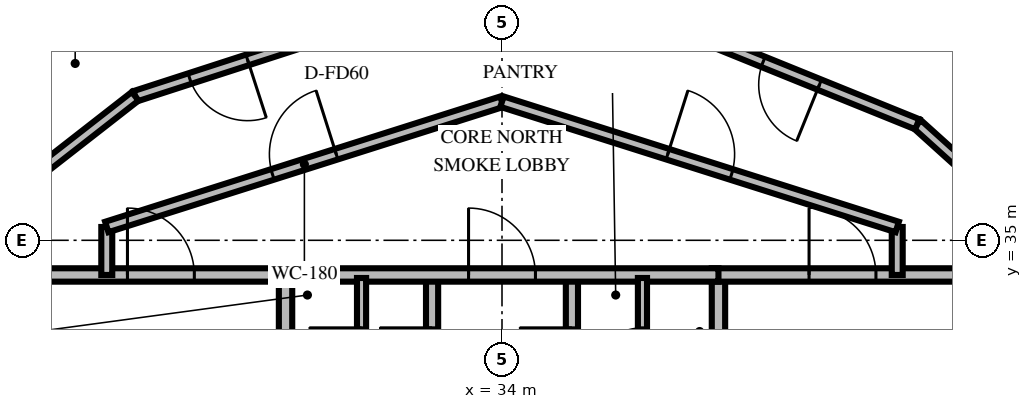
"""IFC4 building model, lengths in metres.
Left out: names, types, materials, properties, quantities, classifications, styles, units other than length and angle.
Written with IfcOpenShell. Run it as: python <this file> out.ifc"""

import sys

from ifc_helpers import new_model, si_unit, direction, frame, frame_2d, origin, place, context, subcontext, project, spatial, rectangle, extrude, element, fill, save


model = new_model("IFC4")
c1 = context("Model", 3, precision=1e-05, world=origin(), true_north=direction((0.0, 1.0)))
c2 = subcontext(c1, "Body", "Model", "MODEL_VIEW")
j1 = project(units=[si_unit("LENGTHUNIT", "METRE"), si_unit("PLANEANGLEUNIT", "RADIAN")], contexts=[c1])
p1 = place(None, origin())
s1 = spatial("IfcSite", under=j1, at=p1, CompositionType="ELEMENT")
p2 = place(p1, origin())
s2 = spatial("IfcBuilding", under=s1, at=p2, CompositionType="ELEMENT")
p3 = place(p2, frame((0.0, 0.0, 270.0)))
s3 = spatial("IfcBuildingStorey", under=s2, at=p3, CompositionType="ELEMENT", Elevation=270.0)
p4 = place(p3, frame((27.754, 42.299, 0.0), z_axis=(0.0, 0.0, 1.0), x_axis=(-0.738936247596, -0.673775349793, 0.0)))
e1 = element("IfcWall", 1, at=p4, inside=s3, PredefinedType="SOLIDWALL", context=c2, shape_type="SweptSolid", body=[
    extrude(rectangle(XDim=7.115, YDim=0.3, at=frame_2d((3.558, 0.0))), origin(), (0.0, 0.0, 1.0), 2.76),
])
p5 = place(p4, frame((2.508, 0.0, 0.8)))
e2 = element("IfcOpeningElement", 2, at=p5, cuts=e1, PredefinedType="OPENING", context=c2, shape_type="SweptSolid", body=[
    extrude(rectangle(XDim=2.1, YDim=1.85, at=frame_2d((1.05, 0.925))), frame((0.0, 0.16, 0.0), z_axis=(0.0, -1.0, 0.0), x_axis=(1.0, 0.0, 0.0)), (0.0, 0.0, 1.0), 0.32),
])
p6 = place(p3, frame((30.44, 30.05, 0.0), z_axis=(0.0, 0.0, 1.0), x_axis=(0.0, 1.0, 0.0)))
e3 = element("IfcWall", 3, at=p6, inside=s3, PredefinedType="SOLIDWALL", context=c2, shape_type="SweptSolid", body=[
    extrude(rectangle(XDim=4.38, YDim=0.22, at=frame_2d((2.19, 0.0))), origin(), (0.0, 0.0, 1.0), 2.46),
])
p7 = place(p6, frame((0.8, 0.0, 0.0)))
e4 = element("IfcOpeningElement", 4, at=p7, cuts=e3, PredefinedType="OPENING", context=c2, shape_type="SweptSolid", body=[
    extrude(rectangle(XDim=1.05, YDim=2.1, at=frame_2d((0.525, 1.05))), frame((0.0, 0.12, 0.0), z_axis=(0.0, -1.0, 0.0), x_axis=(1.0, 0.0, 0.0)), (0.0, 0.0, 1.0), 0.24),
])
p8 = place(p3, frame((26.24, 34.43, 0.0), z_axis=(0.0, 0.0, 1.0), x_axis=(1.0, 0.0, 0.0)))
e5 = element("IfcWall", 5, at=p8, inside=s3, PredefinedType="SOLIDWALL", context=c2, shape_type="SweptSolid", body=[
    extrude(rectangle(XDim=4.31, YDim=0.22, at=frame_2d((2.155, 0.0))), origin(), (0.0, 0.0, 1.0), 2.46),
])
p9 = place(p8, frame((1.6, 0.0, 0.0)))
e6 = element("IfcOpeningElement", 6, at=p9, cuts=e5, PredefinedType="OPENING", context=c2, shape_type="SweptSolid", body=[
    extrude(rectangle(XDim=1.1, YDim=2.15, at=frame_2d((0.55, 1.075))), frame((0.0, 0.12, 0.0), z_axis=(0.0, -1.0, 0.0), x_axis=(1.0, 0.0, 0.0)), (0.0, 0.0, 1.0), 0.24),
])
p10 = place(p3, frame((32.85, 30.05, 0.0), z_axis=(0.0, 0.0, 1.0), x_axis=(0.0, 1.0, 0.0)))
e7 = element("IfcWall", 7, at=p10, inside=s3, PredefinedType="SOLIDWALL", context=c2, shape_type="SweptSolid", body=[
    extrude(rectangle(XDim=4.38, YDim=0.2, at=frame_2d((2.19, 0.0))), origin(), (0.0, 0.0, 1.0), 2.46),
])
p11 = place(p10, frame((2.65, 0.0, 0.0)))
e8 = element("IfcOpeningElement", 8, at=p11, cuts=e7, PredefinedType="OPENING", context=c2, shape_type="SweptSolid", body=[
    extrude(rectangle(XDim=0.86, YDim=2.05, at=frame_2d((0.43, 1.025))), frame((0.0, 0.11, 0.0), z_axis=(0.0, -1.0, 0.0), x_axis=(1.0, 0.0, 0.0)), (0.0, 0.0, 1.0), 0.22),
])
p12 = place(p3, frame((37.56, 30.05, 0.0), z_axis=(0.0, 0.0, 1.0), x_axis=(0.0, 1.0, 0.0)))
e9 = element("IfcWall", 9, at=p12, inside=s3, PredefinedType="SOLIDWALL", context=c2, shape_type="SweptSolid", body=[
    extrude(rectangle(XDim=4.38, YDim=0.22, at=frame_2d((2.19, 0.0))), origin(), (0.0, 0.0, 1.0), 2.46),
])
p13 = place(p12, frame((0.8, 0.0, 0.0)))
e10 = element("IfcOpeningElement", 10, at=p13, cuts=e9, PredefinedType="OPENING", context=c2, shape_type="SweptSolid", body=[
    extrude(rectangle(XDim=1.05, YDim=2.1, at=frame_2d((0.525, 1.05))), frame((0.0, 0.12, 0.0), z_axis=(0.0, -1.0, 0.0), x_axis=(1.0, 0.0, 0.0)), (0.0, 0.0, 1.0), 0.24),
])
p14 = place(p3, frame((37.45, 34.43, 0.0), z_axis=(0.0, 0.0, 1.0), x_axis=(1.0, 0.0, 0.0)))
e11 = element("IfcWall", 11, at=p14, inside=s3, PredefinedType="SOLIDWALL", context=c2, shape_type="SweptSolid", body=[
    extrude(rectangle(XDim=4.31, YDim=0.22, at=frame_2d((2.155, 0.0))), origin(), (0.0, 0.0, 1.0), 2.46),
])
p15 = place(p14, frame((1.6, 0.0, 0.0)))
e12 = element("IfcOpeningElement", 12, at=p15, cuts=e11, PredefinedType="OPENING", context=c2, shape_type="SweptSolid", body=[
    extrude(rectangle(XDim=1.1, YDim=2.15, at=frame_2d((0.55, 1.075))), frame((0.0, 0.12, 0.0), z_axis=(0.0, -1.0, 0.0), x_axis=(1.0, 0.0, 0.0)), (0.0, 0.0, 1.0), 0.24),
])
p16 = place(p3, frame((35.15, 30.05, 0.0), z_axis=(0.0, 0.0, 1.0), x_axis=(0.0, 1.0, 0.0)))
e13 = element("IfcWall", 13, at=p16, inside=s3, PredefinedType="SOLIDWALL", context=c2, shape_type="SweptSolid", body=[
    extrude(rectangle(XDim=4.38, YDim=0.2, at=frame_2d((2.19, 0.0))), origin(), (0.0, 0.0, 1.0), 2.46),
])
p17 = place(p16, frame((2.65, 0.0, 0.0)))
e14 = element("IfcOpeningElement", 14, at=p17, cuts=e13, PredefinedType="OPENING", context=c2, shape_type="SweptSolid", body=[
    extrude(rectangle(XDim=0.86, YDim=2.05, at=frame_2d((0.43, 1.025))), frame((0.0, 0.11, 0.0), z_axis=(0.0, -1.0, 0.0), x_axis=(1.0, 0.0, 0.0)), (0.0, 0.0, 1.0), 0.22),
])
p18 = place(p3, frame((30.44, 34.43, 0.0), z_axis=(0.0, 0.0, 1.0), x_axis=(1.0, 0.0, 0.0)))
e15 = element("IfcWall", 15, at=p18, inside=s3, PredefinedType="SOLIDWALL", context=c2, shape_type="SweptSolid", body=[
    extrude(rectangle(XDim=7.12, YDim=0.22, at=frame_2d((3.56, 0.0))), origin(), (0.0, 0.0, 1.0), 2.46),
])
p19 = place(p18, frame((3.01, 0.0, 0.0)))
e16 = element("IfcOpeningElement", 16, at=p19, cuts=e15, PredefinedType="OPENING", context=c2, shape_type="SweptSolid", body=[
    extrude(rectangle(XDim=1.1, YDim=2.15, at=frame_2d((0.55, 1.075))), frame((0.0, 0.12, 0.0), z_axis=(0.0, -1.0, 0.0), x_axis=(1.0, 0.0, 0.0)), (0.0, 0.0, 1.0), 0.24),
])
p20 = place(p3, frame((31.69, 32.05, 0.0), z_axis=(0.0, 0.0, 1.0), x_axis=(0.0, 1.0, 0.0)))
e17 = element("IfcWall", 17, at=p20, inside=s3, PredefinedType="PARTITIONING", context=c2, shape_type="SweptSolid", body=[
    extrude(rectangle(XDim=2.33, YDim=0.15, at=frame_2d((1.165, 0.0))), origin(), (0.0, 0.0, 1.0), 2.46),
])
p21 = place(p20, frame((0.65, 0.0, 0.0)))
e18 = element("IfcOpeningElement", 18, at=p21, cuts=e17, PredefinedType="OPENING", context=c2, shape_type="SweptSolid", body=[
    extrude(rectangle(XDim=0.86, YDim=2.05, at=frame_2d((0.43, 1.025))), frame((0.0, 0.085, 0.0), z_axis=(0.0, -1.0, 0.0), x_axis=(1.0, 0.0, 0.0)), (0.0, 0.0, 1.0), 0.17),
])
p22 = place(p3, frame((36.31, 32.05, 0.0), z_axis=(0.0, 0.0, 1.0), x_axis=(0.0, 1.0, 0.0)))
e19 = element("IfcWall", 19, at=p22, inside=s3, PredefinedType="PARTITIONING", context=c2, shape_type="SweptSolid", body=[
    extrude(rectangle(XDim=2.33, YDim=0.15, at=frame_2d((1.165, 0.0))), origin(), (0.0, 0.0, 1.0), 2.46),
])
p23 = place(p22, frame((0.65, 0.0, 0.0)))
e20 = element("IfcOpeningElement", 20, at=p23, cuts=e19, PredefinedType="OPENING", context=c2, shape_type="SweptSolid", body=[
    extrude(rectangle(XDim=0.86, YDim=2.05, at=frame_2d((0.43, 1.025))), frame((0.0, 0.085, 0.0), z_axis=(0.0, -1.0, 0.0), x_axis=(1.0, 0.0, 0.0)), (0.0, 0.0, 1.0), 0.17),
])
for number, where, z_axis, x_axis in (
    (21, (27.5, 34.43, 0.0), (0.0, 0.0, 1.0), (0.0, 1.0, 0.0)),
    (22, (40.5, 35.219, 0.0), (0.0, 0.0, 1.0), (0.0, -1.0, 0.0)),
):
    element("IfcWall", number, at=place(p3, frame(where, z_axis=z_axis, x_axis=x_axis)), inside=s3, PredefinedType="PARTITIONING", context=c2, shape_type="SweptSolid", body=[
        extrude(rectangle(XDim=0.789, YDim=0.18, at=frame_2d((0.395, 0.0))), origin(), (0.0, 0.0, 1.0), 2.46),
    ])
p24 = place(p3, frame((27.5, 35.219, 0.0), z_axis=(0.0, 0.0, 1.0), x_axis=(0.953228121756, 0.302251795518, 0.0)))
e23 = element("IfcWall", 23, at=p24, inside=s3, PredefinedType="PARTITIONING", context=c2, shape_type="SweptSolid", body=[
    extrude(rectangle(XDim=6.819, YDim=0.18, at=frame_2d((3.409, 0.0))), origin(), (0.0, 0.0, 1.0), 2.46),
])
p25 = place(p24, frame((2.86, 0.0, 0.0)))
e24 = element("IfcOpeningElement", 24, at=p25, cuts=e23, PredefinedType="OPENING", context=c2, shape_type="SweptSolid", body=[
    extrude(rectangle(XDim=1.1, YDim=2.15, at=frame_2d((0.55, 1.075))), frame((0.0, 0.1, 0.0), z_axis=(0.0, -1.0, 0.0), x_axis=(1.0, 0.0, 0.0)), (0.0, 0.0, 1.0), 0.2),
])
p26 = place(p3, frame((34.0, 37.28, 0.0), z_axis=(0.0, 0.0, 1.0), x_axis=(0.953228121756, -0.302251795518, 0.0)))
e25 = element("IfcWall", 25, at=p26, inside=s3, PredefinedType="PARTITIONING", context=c2, shape_type="SweptSolid", body=[
    extrude(rectangle(XDim=6.819, YDim=0.18, at=frame_2d((3.409, 0.0))), origin(), (0.0, 0.0, 1.0), 2.46),
])
p27 = place(p26, frame((2.86, 0.0, 0.0)))
e26 = element("IfcOpeningElement", 26, at=p27, cuts=e25, PredefinedType="OPENING", context=c2, shape_type="SweptSolid", body=[
    extrude(rectangle(XDim=1.1, YDim=2.15, at=frame_2d((0.55, 1.075))), frame((0.0, 0.1, 0.0), z_axis=(0.0, -1.0, 0.0), x_axis=(1.0, 0.0, 0.0)), (0.0, 0.0, 1.0), 0.2),
])
p28 = place(p3, frame((44.149, 33.915, 0.0), z_axis=(0.0, 0.0, 1.0), x_axis=(-0.742573984857, 0.669764045775, 0.0)))
e27 = element("IfcWall", 27, at=p28, inside=s3, PredefinedType="PARTITIONING", context=c2, shape_type="SweptSolid", body=[
    extrude(rectangle(XDim=4.47, YDim=0.18, at=frame_2d((2.235, 0.0))), origin(), (0.0, 0.0, 1.0), 2.46),
])
p29 = place(p3, frame((40.83, 36.908, 0.0), z_axis=(0.0, 0.0, 1.0), x_axis=(-0.926859496036, 0.375408410411, 0.0)))
e28 = element("IfcWall", 28, at=p29, inside=s3, PredefinedType="PARTITIONING", context=c2, shape_type="SweptSolid", body=[
    extrude(rectangle(XDim=4.47, YDim=0.18, at=frame_2d((2.235, 0.0))), origin(), (0.0, 0.0, 1.0), 2.46),
])
p30 = place(p29, frame((1.735, 0.0, 0.0)))
e29 = element("IfcOpeningElement", 29, at=p30, cuts=e28, PredefinedType="OPENING", context=c2, shape_type="SweptSolid", body=[
    extrude(rectangle(XDim=1.0, YDim=2.15, at=frame_2d((0.5, 1.075))), frame((0.0, 0.1, 0.0), z_axis=(0.0, -1.0, 0.0), x_axis=(1.0, 0.0, 0.0)), (0.0, 0.0, 1.0), 0.2),
])
p31 = place(p3, frame((32.22, 38.746, 0.0), z_axis=(0.0, 0.0, 1.0), x_axis=(-0.951331063375, -0.30817074465, 0.0)))
e30 = element("IfcWall", 30, at=p31, inside=s3, PredefinedType="PARTITIONING", context=c2, shape_type="SweptSolid", body=[
    extrude(rectangle(XDim=4.47, YDim=0.18, at=frame_2d((2.235, 0.0))), origin(), (0.0, 0.0, 1.0), 2.46),
])
p32 = place(p31, frame((2.527, 0.0, 0.0)))
e31 = element("IfcOpeningElement", 31, at=p32, cuts=e30, PredefinedType="OPENING", context=c2, shape_type="SweptSolid", body=[
    extrude(rectangle(XDim=1.0, YDim=2.15, at=frame_2d((0.5, 1.075))), frame((0.0, 0.1, 0.0), z_axis=(0.0, -1.0, 0.0), x_axis=(1.0, 0.0, 0.0)), (0.0, 0.0, 1.0), 0.2),
])
p33 = place(p3, frame((27.968, 37.369, 0.0), z_axis=(0.0, 0.0, 1.0), x_axis=(-0.78855157168, -0.614968632371, 0.0)))
e32 = element("IfcWall", 32, at=p33, inside=s3, PredefinedType="PARTITIONING", context=c2, shape_type="SweptSolid", body=[
    extrude(rectangle(XDim=4.47, YDim=0.18, at=frame_2d((2.235, 0.0))), origin(), (0.0, 0.0, 1.0), 2.46),
])
p34 = place(p3, frame((27.101, 39.003, 0.0), z_axis=(0.0, 0.0, 1.0), x_axis=(-0.78853889841, -0.614984882492, 0.0)))
e33 = element("IfcWall", 33, at=p34, inside=s3, PredefinedType="PARTITIONING", context=c2, shape_type="SweptSolid", body=[
    extrude(rectangle(XDim=5.112, YDim=0.125, at=frame_2d((2.556, 0.0))), origin(), (0.0, 0.0, 1.0), 2.46),
])
p35 = place(p9, origin())
e34 = element("IfcDoor", 34, at=p35, inside=s3, OperationType="SINGLE_SWING_LEFT", PredefinedType="DOOR", context=c2, shape_type="SweptSolid", body=[
    extrude(rectangle(XDim=1.1, YDim=2.15, at=frame_2d((0.55, 1.075))), frame((0.0, 0.025, 0.0), z_axis=(0.0, -1.0, 0.0), x_axis=(1.0, 0.0, 0.0)), (0.0, 0.0, 1.0), 0.05),
])
fill(e6, e34)
p36 = place(p11, origin())
e35 = element("IfcDoor", 35, at=p36, inside=s3, OperationType="SINGLE_SWING_RIGHT", PredefinedType="TRAPDOOR", context=c2, shape_type="SweptSolid", body=[
    extrude(rectangle(XDim=0.86, YDim=2.05, at=frame_2d((0.43, 1.025))), frame((0.0, 0.025, 0.0), z_axis=(0.0, -1.0, 0.0), x_axis=(1.0, 0.0, 0.0)), (0.0, 0.0, 1.0), 0.05),
])
fill(e8, e35)
p37 = place(p15, origin())
e36 = element("IfcDoor", 36, at=p37, inside=s3, OperationType="SINGLE_SWING_LEFT", PredefinedType="DOOR", context=c2, shape_type="SweptSolid", body=[
    extrude(rectangle(XDim=1.1, YDim=2.15, at=frame_2d((0.55, 1.075))), frame((0.0, 0.025, 0.0), z_axis=(0.0, -1.0, 0.0), x_axis=(1.0, 0.0, 0.0)), (0.0, 0.0, 1.0), 0.05),
])
fill(e12, e36)
p38 = place(p17, origin())
e37 = element("IfcDoor", 37, at=p38, inside=s3, OperationType="SINGLE_SWING_RIGHT", PredefinedType="TRAPDOOR", context=c2, shape_type="SweptSolid", body=[
    extrude(rectangle(XDim=0.86, YDim=2.05, at=frame_2d((0.43, 1.025))), frame((0.0, 0.025, 0.0), z_axis=(0.0, -1.0, 0.0), x_axis=(1.0, 0.0, 0.0)), (0.0, 0.0, 1.0), 0.05),
])
fill(e14, e37)
p39 = place(p19, origin())
e38 = element("IfcDoor", 38, at=p39, inside=s3, OperationType="SINGLE_SWING_LEFT", PredefinedType="DOOR", context=c2, shape_type="SweptSolid", body=[
    extrude(rectangle(XDim=1.1, YDim=2.15, at=frame_2d((0.55, 1.075))), frame((0.0, 0.025, 0.0), z_axis=(0.0, -1.0, 0.0), x_axis=(1.0, 0.0, 0.0)), (0.0, 0.0, 1.0), 0.05),
])
fill(e16, e38)
p40 = place(p21, origin())
e39 = element("IfcDoor", 39, at=p40, inside=s3, OperationType="SINGLE_SWING_RIGHT", PredefinedType="TRAPDOOR", context=c2, shape_type="SweptSolid", body=[
    extrude(rectangle(XDim=0.86, YDim=2.05, at=frame_2d((0.43, 1.025))), frame((0.0, 0.025, 0.0), z_axis=(0.0, -1.0, 0.0), x_axis=(1.0, 0.0, 0.0)), (0.0, 0.0, 1.0), 0.05),
])
fill(e18, e39)
p41 = place(p23, origin())
e40 = element("IfcDoor", 40, at=p41, inside=s3, OperationType="SINGLE_SWING_LEFT", PredefinedType="TRAPDOOR", context=c2, shape_type="SweptSolid", body=[
    extrude(rectangle(XDim=0.86, YDim=2.05, at=frame_2d((0.43, 1.025))), frame((0.0, 0.025, 0.0), z_axis=(0.0, -1.0, 0.0), x_axis=(1.0, 0.0, 0.0)), (0.0, 0.0, 1.0), 0.05),
])
fill(e20, e40)
p42 = place(p25, origin())
e41 = element("IfcDoor", 41, at=p42, inside=s3, OperationType="SINGLE_SWING_RIGHT", PredefinedType="DOOR", context=c2, shape_type="SweptSolid", body=[
    extrude(rectangle(XDim=1.1, YDim=2.15, at=frame_2d((0.55, 1.075))), frame((0.0, 0.025, 0.0), z_axis=(0.0, -1.0, 0.0), x_axis=(1.0, 0.0, 0.0)), (0.0, 0.0, 1.0), 0.05),
])
fill(e24, e41)
p43 = place(p27, origin())
e42 = element("IfcDoor", 42, at=p43, inside=s3, OperationType="SINGLE_SWING_LEFT", PredefinedType="DOOR", context=c2, shape_type="SweptSolid", body=[
    extrude(rectangle(XDim=1.1, YDim=2.15, at=frame_2d((0.55, 1.075))), frame((0.0, 0.025, 0.0), z_axis=(0.0, -1.0, 0.0), x_axis=(1.0, 0.0, 0.0)), (0.0, 0.0, 1.0), 0.05),
])
fill(e26, e42)
p44 = place(p30, origin())
e43 = element("IfcDoor", 43, at=p44, inside=s3, OperationType="SINGLE_SWING_LEFT", PredefinedType="DOOR", context=c2, shape_type="SweptSolid", body=[
    extrude(rectangle(XDim=1.0, YDim=2.15, at=frame_2d((0.5, 1.075))), frame((0.0, 0.025, 0.0), z_axis=(0.0, -1.0, 0.0), x_axis=(1.0, 0.0, 0.0)), (0.0, 0.0, 1.0), 0.05),
])
fill(e29, e43)
p45 = place(p32, origin())
e44 = element("IfcDoor", 44, at=p45, inside=s3, OperationType="SINGLE_SWING_LEFT", PredefinedType="DOOR", context=c2, shape_type="SweptSolid", body=[
    extrude(rectangle(XDim=1.0, YDim=2.15, at=frame_2d((0.5, 1.075))), frame((0.0, 0.025, 0.0), z_axis=(0.0, -1.0, 0.0), x_axis=(1.0, 0.0, 0.0)), (0.0, 0.0, 1.0), 0.05),
])
fill(e31, e44)
save(model, sys.argv[1])
